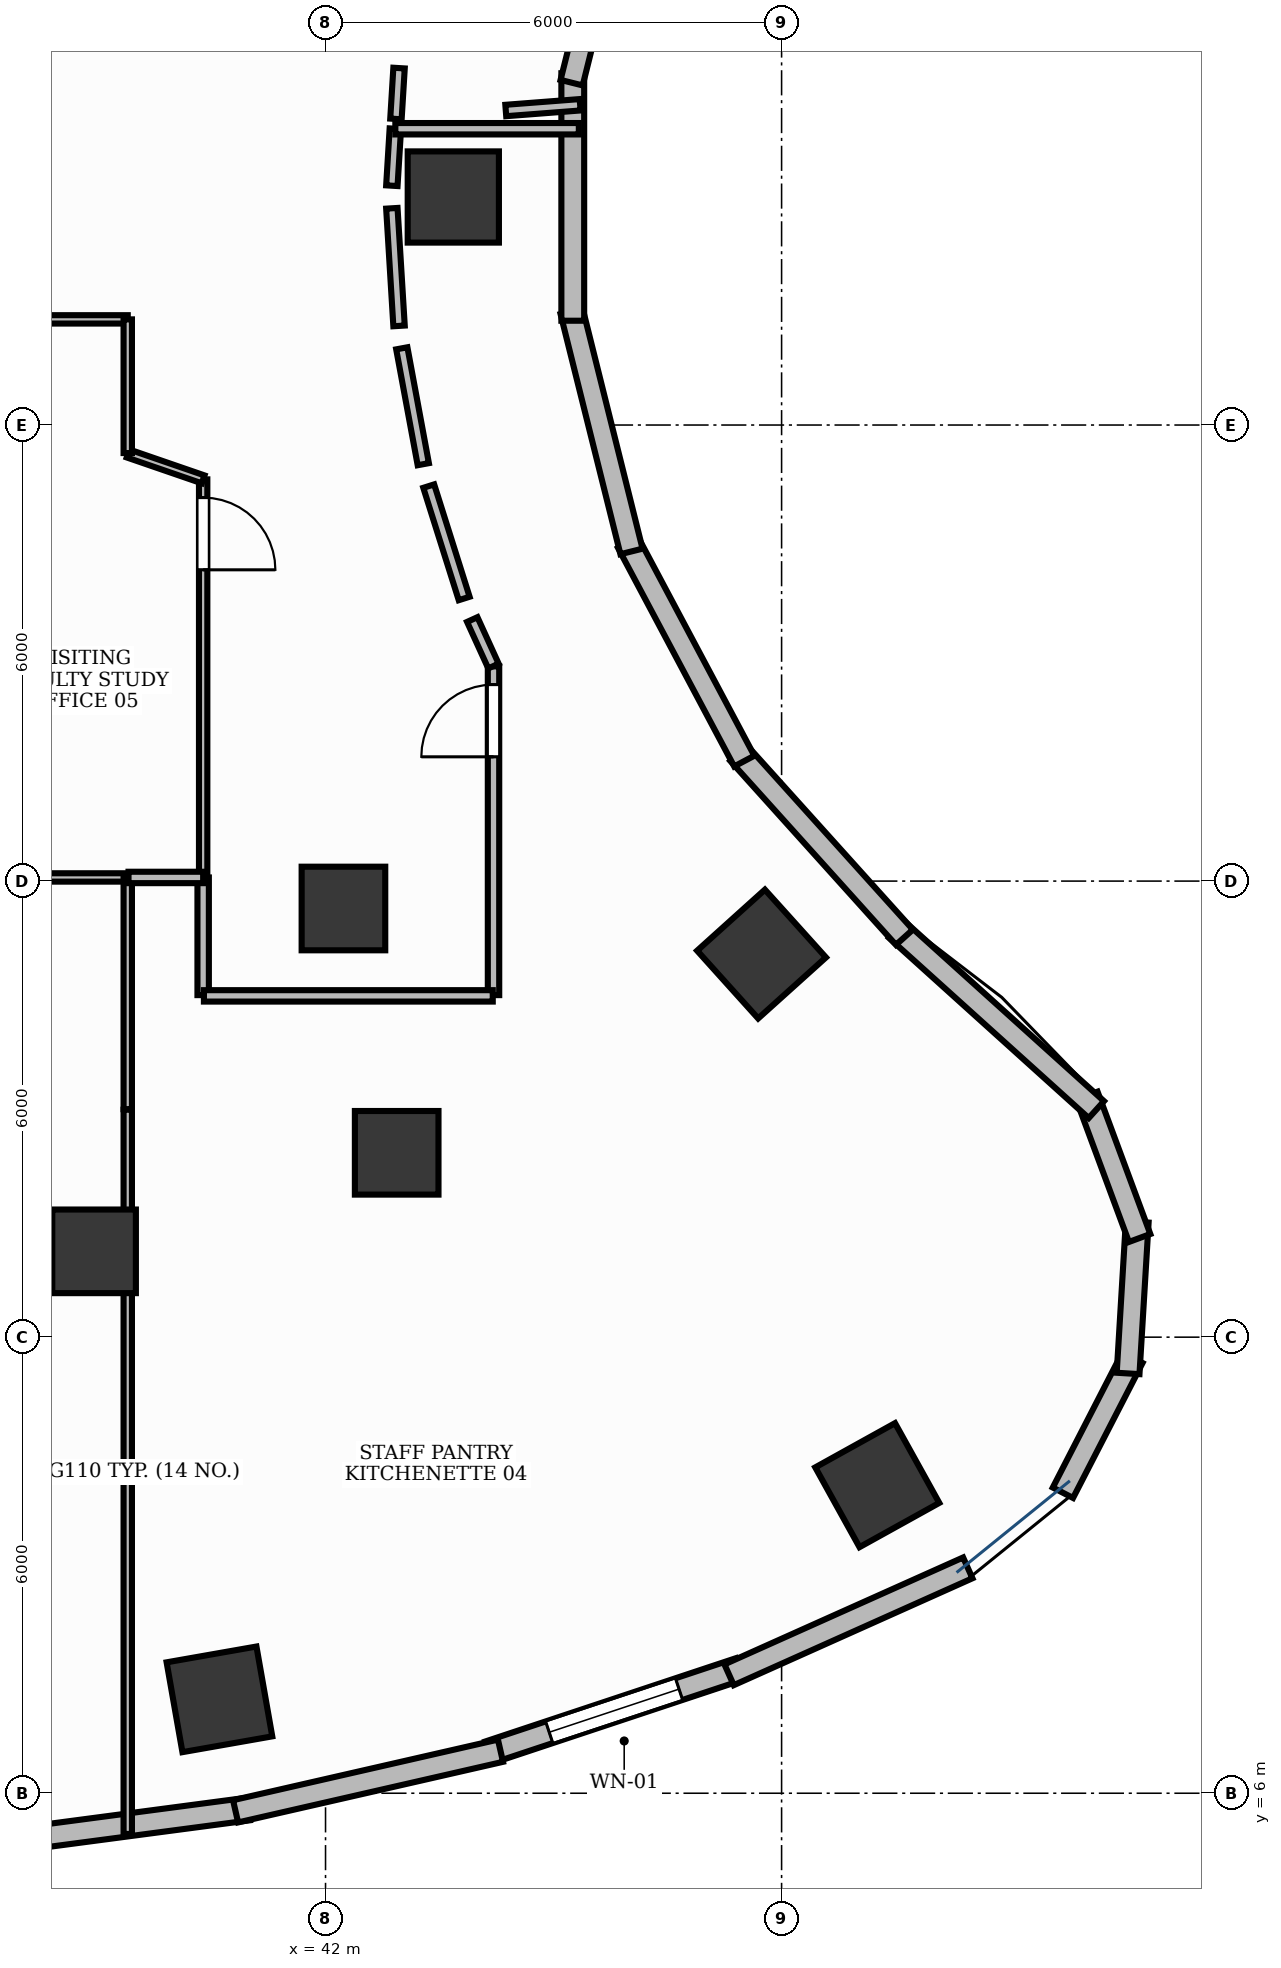
"""IFC4 building model, lengths in metres.
Left out: names, types, materials, properties, quantities, classifications, styles, units other than length and angle.
Written with IfcOpenShell. Run it as: python <this file> out.ifc"""

import sys

from ifc_helpers import new_model, si_unit, direction, frame, frame_2d, origin, origin_2d, place, context, subcontext, project, spatial, rectangle, extrude, element, fill, save


model = new_model("IFC4")
c1 = context("Model", 3, precision=1e-05, world=origin(), true_north=direction((0.0, 1.0)))
c2 = subcontext(c1, "Body", "Model", "MODEL_VIEW")
j1 = project(units=[si_unit("LENGTHUNIT", "METRE"), si_unit("PLANEANGLEUNIT", "RADIAN")], contexts=[c1])
p1 = place(None, origin())
s1 = spatial("IfcSite", under=j1, at=p1, CompositionType="ELEMENT")
p2 = place(p1, origin())
s2 = spatial("IfcBuilding", under=s1, at=p2, CompositionType="ELEMENT")
p3 = place(p2, frame((0.0, 0.0, 127.8)))
s3 = spatial("IfcBuildingStorey", under=s2, at=p3, CompositionType="ELEMENT", Elevation=127.8)
p4 = place(p3, frame((40.604, 7.235, -0.0), z_axis=(0.0, 0.0, 1.0), x_axis=(0.984868307662, 0.173304404339, 0.0)))
e1 = element("IfcColumn", 1, at=p4, inside=s3, PredefinedType="COLUMN", context=c2, shape_type="SweptSolid", body=[
    extrude(rectangle(XDim=1.2, YDim=1.2, at=origin_2d()), origin(), (0.0, 0.0, 1.0), 3.901),
])
p5 = place(p3, frame((38.955, 13.129, -0.0), z_axis=(0.0, 0.0, 1.0), x_axis=(1.0, 0.0, 0.0)))
e2 = element("IfcColumn", 2, at=p5, inside=s3, PredefinedType="COLUMN", context=c2, shape_type="SweptSolid", body=[
    extrude(rectangle(XDim=1.1, YDim=1.1, at=origin_2d()), origin(), (0.0, 0.0, 1.0), 3.901),
])
p6 = place(p3, frame((49.259, 10.053, -0.0), z_axis=(0.0, 0.0, 1.0), x_axis=(0.874535078577, 0.484962262797, 0.0)))
e3 = element("IfcColumn", 3, at=p6, inside=s3, PredefinedType="COLUMN", context=c2, shape_type="SweptSolid", body=[
    extrude(rectangle(XDim=1.2, YDim=1.2, at=origin_2d()), origin(), (0.0, 0.0, 1.0), 3.901),
])
p7 = place(p3, frame((42.936, 14.425, -0.0), z_axis=(0.0, 0.0, 1.0), x_axis=(1.0, 0.0, 0.0)))
e4 = element("IfcColumn", 4, at=p7, inside=s3, PredefinedType="COLUMN", context=c2, shape_type="SweptSolid", body=[
    extrude(rectangle(XDim=1.1, YDim=1.1, at=origin_2d()), origin(), (0.0, 0.0, 1.0), 3.901),
])
p8 = place(p3, frame((47.736, 17.04, -0.0), z_axis=(0.0, 0.0, 1.0), x_axis=(-0.669130606359, 0.743144825477, 0.0)))
e5 = element("IfcColumn", 5, at=p8, inside=s3, PredefinedType="COLUMN", context=c2, shape_type="SweptSolid", body=[
    extrude(rectangle(XDim=1.2, YDim=1.2, at=origin_2d()), origin(), (0.0, 0.0, 1.0), 3.901),
])
p9 = place(p3, frame((42.236, 17.639, -0.0), z_axis=(0.0, 0.0, 1.0), x_axis=(1.0, 0.0, 0.0)))
e6 = element("IfcColumn", 6, at=p9, inside=s3, PredefinedType="COLUMN", context=c2, shape_type="SweptSolid", body=[
    extrude(rectangle(XDim=1.1, YDim=1.1, at=origin_2d()), origin(), (0.0, 0.0, 1.0), 3.901),
])
p10 = place(p3, frame((43.681, 27.0, -0.0), z_axis=(0.0, 0.0, 1.0), x_axis=(0.0, 1.0, 0.0)))
e7 = element("IfcColumn", 7, at=p10, inside=s3, PredefinedType="COLUMN", context=c2, shape_type="SweptSolid", body=[
    extrude(rectangle(XDim=1.2, YDim=1.2, at=origin_2d()), origin(), (0.0, 0.0, 1.0), 3.901),
])
p11 = place(p3, frame((44.147, 6.538, 0.0), z_axis=(0.0, 0.0, 1.0), x_axis=(0.948949854506, 0.315426970364, 0.0)))
e8 = element("IfcWall", 8, at=p11, inside=s3, PredefinedType="STANDARD", context=c2, shape_type="SweptSolid", body=[
    extrude(rectangle(XDim=3.476, YDim=0.3, at=frame_2d((1.738, 0.0))), origin(), (0.0, 0.0, 1.0), 3.9),
])
p12 = place(p11, frame((0.838, 0.0, 0.9)))
e9 = element("IfcOpeningElement", 9, at=p12, cuts=e8, PredefinedType="OPENING", context=c2, shape_type="SweptSolid", body=[
    extrude(rectangle(XDim=1.8, YDim=2.1, at=frame_2d((0.9, 1.05))), frame((0.0, 0.165, 0.0), z_axis=(0.0, -1.0, 0.0), x_axis=(1.0, 0.0, 0.0)), (0.0, 0.0, 1.0), 0.33),
])
p13 = place(p3, frame((37.402, 5.319, 0.0), z_axis=(0.0, 0.0, 1.0), x_axis=(0.991372969521, 0.131071107816, 0.0)))
e10 = element("IfcWall", 10, at=p13, inside=s3, PredefinedType="STANDARD", context=c2, shape_type="SweptSolid", body=[
    extrude(rectangle(XDim=3.615, YDim=0.3, at=frame_2d((1.808, 0.0))), origin(), (0.0, 0.0, 1.0), 3.9),
])
p14 = place(p3, frame((40.816, 5.762, 0.0), z_axis=(0.0, 0.0, 1.0), x_axis=(0.974841550422, 0.222898971669, 0.0)))
e11 = element("IfcWall", 11, at=p14, inside=s3, PredefinedType="STANDARD", context=c2, shape_type="SweptSolid", body=[
    extrude(rectangle(XDim=3.575, YDim=0.3, at=frame_2d((1.788, 0.0))), origin(), (0.0, 0.0, 1.0), 3.9),
])
p15 = place(p3, frame((47.309, 7.559, 0.0), z_axis=(0.0, 0.0, 1.0), x_axis=(0.912672725317, 0.408691199395, 0.0)))
e12 = element("IfcWall", 12, at=p15, inside=s3, PredefinedType="STANDARD", context=c2, shape_type="SweptSolid", body=[
    extrude(rectangle(XDim=3.441, YDim=0.3, at=frame_2d((1.72, 0.0))), origin(), (0.0, 0.0, 1.0), 3.9),
])
for number, where, z_axis, x_axis in (
    (13, (51.701, 9.953, 0.0), (0.0, 0.0, 1.0), (0.458, 0.889, 0.0)),
    (14, (52.559, 11.523, 0.0), (0.0, 0.0, 1.0), (0.06, 0.998, 0.0)),
):
    element("IfcWall", number, at=place(p3, frame(where, z_axis=z_axis, x_axis=x_axis)), inside=s3, PredefinedType="STANDARD", context=c2, shape_type="SweptSolid", body=[
        extrude(rectangle(XDim=1.998, YDim=0.3, at=frame_2d((0.999, 0.0))), origin(), (0.0, 0.0, 1.0), 3.9),
    ])
p16 = place(p3, frame((52.71, 13.305, 0.0), z_axis=(0.0, 0.0, 1.0), x_axis=(-0.347370087337, 0.937728117539, 0.0)))
e15 = element("IfcWall", 15, at=p16, inside=s3, PredefinedType="STANDARD", context=c2, shape_type="SweptSolid", body=[
    extrude(rectangle(XDim=1.997, YDim=0.3, at=frame_2d((0.999, 0.0))), origin(), (0.0, 0.0, 1.0), 3.9),
])
p17 = place(p3, frame((52.141, 14.994, 0.0), z_axis=(0.0, 0.0, 1.0), x_axis=(-0.74255963233, 0.669779958221, 0.0)))
e16 = element("IfcWall", 16, at=p17, inside=s3, PredefinedType="STANDARD", context=c2, shape_type="SweptSolid", body=[
    extrude(rectangle(XDim=3.539, YDim=0.3, at=frame_2d((1.77, 0.0))), origin(), (0.0, 0.0, 1.0), 3.9),
])
p18 = place(p3, frame((49.616, 17.262, 0.0), z_axis=(0.0, 0.0, 1.0), x_axis=(-0.669167727967, 0.743111399353, 0.0)))
e17 = element("IfcWall", 17, at=p18, inside=s3, PredefinedType="STANDARD", context=c2, shape_type="SweptSolid", body=[
    extrude(rectangle(XDim=3.255, YDim=0.3, at=frame_2d((1.628, 0.0))), origin(), (0.0, 0.0, 1.0), 3.9),
])
p19 = place(p3, frame((47.509, 19.579, 0.0), z_axis=(0.0, 0.0, 1.0), x_axis=(-0.469451284634, 0.882958374645, 0.0)))
e18 = element("IfcWall", 18, at=p19, inside=s3, PredefinedType="STANDARD", context=c2, shape_type="SweptSolid", body=[
    extrude(rectangle(XDim=3.256, YDim=0.3, at=frame_2d((1.628, 0.0))), origin(), (0.0, 0.0, 1.0), 3.9),
])
p20 = place(p3, frame((46.025, 22.337, 0.0), z_axis=(0.0, 0.0, 1.0), x_axis=(-0.241900409149, 0.970301083197, 0.0)))
e19 = element("IfcWall", 19, at=p20, inside=s3, PredefinedType="STANDARD", context=c2, shape_type="SweptSolid", body=[
    extrude(rectangle(XDim=3.256, YDim=0.3, at=frame_2d((1.628, 0.0))), origin(), (0.0, 0.0, 1.0), 3.9),
])
p21 = place(p3, frame((45.253, 25.372, 0.0), z_axis=(0.0, 0.0, 1.0), x_axis=(0.0, 1.0, 0.0)))
e20 = element("IfcWall", 20, at=p21, inside=s3, PredefinedType="STANDARD", context=c2, shape_type="SweptSolid", body=[
    extrude(rectangle(XDim=3.255, YDim=0.3, at=frame_2d((1.628, 0.0))), origin(), (0.0, 0.0, 1.0), 3.9),
])
p22 = place(p3, frame((45.238, 28.504, 0.0), z_axis=(0.0, 0.0, 1.0), x_axis=(0.241900409149, 0.970301083197, 0.0)))
e21 = element("IfcWall", 21, at=p22, inside=s3, PredefinedType="STANDARD", context=c2, shape_type="SweptSolid", body=[
    extrude(rectangle(XDim=3.256, YDim=0.3, at=frame_2d((1.628, 0.0))), origin(), (0.0, 0.0, 1.0), 3.9),
])
p23 = place(p3, frame((44.21, 16.5, 0.0), z_axis=(0.0, 0.0, 1.0), x_axis=(0.0, 1.0, 0.0)))
e22 = element("IfcWall", 22, at=p23, inside=s3, PredefinedType="PARTITIONING", context=c2, shape_type="SweptSolid", body=[
    extrude(rectangle(XDim=4.325, YDim=0.15, at=frame_2d((2.163, 0.0))), origin(), (0.0, 0.0, 1.0), 2.91),
])
p24 = place(p23, frame((3.135, 0.0, 0.0)))
e23 = element("IfcOpeningElement", 23, at=p24, cuts=e22, PredefinedType="OPENING", context=c2, shape_type="SweptSolid", body=[
    extrude(rectangle(XDim=0.95, YDim=2.15, at=frame_2d((0.475, 1.075))), frame((0.0, 0.09, 0.0), z_axis=(0.0, -1.0, 0.0), x_axis=(1.0, 0.0, 0.0)), (0.0, 0.0, 1.0), 0.18),
])
p25 = place(p3, frame((40.39, 23.285, 0.0), z_axis=(0.0, 0.0, 1.0), x_axis=(0.0, -1.0, 0.0)))
e24 = element("IfcWall", 24, at=p25, inside=s3, PredefinedType="MOVABLE", context=c2, shape_type="SweptSolid", body=[
    extrude(rectangle(XDim=5.227, YDim=0.11, at=frame_2d((2.614, 0.0))), origin(), (0.0, 0.0, 1.0), 2.91),
])
p26 = place(p25, frame((0.24, 0.0, 0.0)))
e25 = element("IfcOpeningElement", 25, at=p26, cuts=e24, PredefinedType="OPENING", context=c2, shape_type="SweptSolid", body=[
    extrude(rectangle(XDim=0.95, YDim=2.15, at=frame_2d((0.475, 1.075))), frame((0.0, 0.07, 0.0), z_axis=(0.0, -1.0, 0.0), x_axis=(1.0, 0.0, 0.0)), (0.0, 0.0, 1.0), 0.14),
])
p27 = place(p3, frame((36.912, 18.048, 0.0), z_axis=(0.0, 0.0, 1.0), x_axis=(1.0, 0.0, 0.0)))
e26 = element("IfcWall", 26, at=p27, inside=s3, PredefinedType="MOVABLE", context=c2, shape_type="SweptSolid", body=[
    extrude(rectangle(XDim=2.486, YDim=0.11, at=frame_2d((1.243, 0.0))), origin(), (0.0, 0.0, 1.0), 2.91),
])
p28 = place(p3, frame((39.398, 18.048, 0.0), z_axis=(0.0, 0.0, 1.0), x_axis=(0.0, -1.0, 0.0)))
e27 = element("IfcWall", 27, at=p28, inside=s3, PredefinedType="MOVABLE", context=c2, shape_type="SweptSolid", body=[
    extrude(rectangle(XDim=3.049, YDim=0.11, at=frame_2d((1.524, 0.0))), origin(), (0.0, 0.0, 1.0), 2.91),
])
p29 = place(p3, frame((39.398, 14.993, 0.0), z_axis=(0.0, 0.0, 1.0), x_axis=(0.0, -1.0, 0.0)))
e28 = element("IfcWall", 28, at=p29, inside=s3, PredefinedType="MOVABLE", context=c2, shape_type="SweptSolid", body=[
    extrude(rectangle(XDim=9.529, YDim=0.11, at=frame_2d((4.764, 0.0))), origin(), (0.0, 0.0, 1.0), 2.91),
])
p30 = place(p3, frame((40.39, 18.048, 0.0), z_axis=(0.0, 0.0, 1.0), x_axis=(0.0, -1.0, 0.0)))
e29 = element("IfcWall", 29, at=p30, inside=s3, PredefinedType="PARTITIONING", context=c2, shape_type="SweptSolid", body=[
    extrude(rectangle(XDim=1.548, YDim=0.15, at=frame_2d((0.774, 0.0))), origin(), (0.0, 0.0, 1.0), 2.91),
])
p31 = place(p3, frame((40.4, 16.49, 0.0), z_axis=(0.0, 0.0, 1.0), x_axis=(1.0, 0.0, 0.0)))
e30 = element("IfcWall", 30, at=p31, inside=s3, PredefinedType="PARTITIONING", context=c2, shape_type="SweptSolid", body=[
    extrude(rectangle(XDim=3.8, YDim=0.15, at=frame_2d((1.9, 0.0))), origin(), (0.0, 0.0, 1.0), 2.91),
])
p32 = place(p3, frame((44.209, 20.829, 0.0), z_axis=(0.0, 0.0, 1.0), x_axis=(-0.414377467152, 0.910105111905, 0.0)))
e31 = element("IfcWall", 31, at=p32, inside=s3, PredefinedType="PARTITIONING", context=c2, shape_type="SweptSolid", body=[
    extrude(rectangle(XDim=0.672, YDim=0.15, at=frame_2d((0.336, 0.0))), origin(), (0.0, 0.0, 1.0), 2.91),
])
p33 = place(p3, frame((43.824, 21.718, 0.0), z_axis=(0.0, 0.0, 1.0), x_axis=(-0.300641414783, 0.953737248783, 0.0)))
e32 = element("IfcWall", 32, at=p33, inside=s3, PredefinedType="PARTITIONING", context=c2, shape_type="SweptSolid", body=[
    extrude(rectangle(XDim=1.55, YDim=0.15, at=frame_2d((0.775, 0.0))), origin(), (0.0, 0.0, 1.0), 2.91),
])
p34 = place(p3, frame((43.286, 23.485, 0.0), z_axis=(0.0, 0.0, 1.0), x_axis=(-0.182168192784, 0.983267384559, 0.0)))
e33 = element("IfcWall", 33, at=p34, inside=s3, PredefinedType="PARTITIONING", context=c2, shape_type="SweptSolid", body=[
    extrude(rectangle(XDim=1.551, YDim=0.15, at=frame_2d((0.775, 0.0))), origin(), (0.0, 0.0, 1.0), 2.91),
])
p35 = place(p3, frame((42.967, 25.304, 0.0), z_axis=(0.0, 0.0, 1.0), x_axis=(-0.061103659378, 0.99813142562, 0.0)))
e34 = element("IfcWall", 34, at=p35, inside=s3, PredefinedType="PARTITIONING", context=c2, shape_type="SweptSolid", body=[
    extrude(rectangle(XDim=1.55, YDim=0.15, at=frame_2d((0.775, 0.0))), origin(), (0.0, 0.0, 1.0), 2.91),
])
p36 = place(p3, frame((42.873, 27.149, 0.0), z_axis=(0.0, 0.0, 1.0), x_axis=(0.061143125985, 0.998129008768, 0.0)))
e35 = element("IfcWall", 35, at=p36, inside=s3, PredefinedType="PARTITIONING", context=c2, shape_type="SweptSolid", body=[
    extrude(rectangle(XDim=0.751, YDim=0.15, at=frame_2d((0.375, 0.0))), origin(), (0.0, 0.0, 1.0), 2.91),
])
p37 = place(p3, frame((42.918, 27.898, 0.0), z_axis=(0.0, 0.0, 1.0), x_axis=(1.0, 0.0, 0.0)))
e36 = element("IfcWall", 36, at=p37, inside=s3, PredefinedType="PARTITIONING", context=c2, shape_type="SweptSolid", body=[
    extrude(rectangle(XDim=2.414, YDim=0.15, at=frame_2d((1.207, 0.0))), origin(), (0.0, 0.0, 1.0), 2.91),
])
p38 = place(p3, frame((39.408, 18.048, 0.0), z_axis=(0.0, 0.0, 1.0), x_axis=(1.0, 0.0, 0.0)))
e37 = element("IfcWall", 37, at=p38, inside=s3, PredefinedType="PARTITIONING", context=c2, shape_type="SweptSolid", body=[
    extrude(rectangle(XDim=0.982, YDim=0.15, at=frame_2d((0.491, 0.0))), origin(), (0.0, 0.0, 1.0), 2.91),
])
p39 = place(p3, frame((39.402, 23.625, 0.0), z_axis=(0.0, 0.0, 1.0), x_axis=(0.945457381587, -0.325745820547, 0.0)))
e38 = element("IfcWall", 38, at=p39, inside=s3, PredefinedType="MOVABLE", context=c2, shape_type="SweptSolid", body=[
    extrude(rectangle(XDim=1.045, YDim=0.11, at=frame_2d((0.522, 0.0))), origin(), (0.0, 0.0, 1.0), 2.91),
])
p40 = place(p3, frame((37.36, 25.39, 0.0), z_axis=(0.0, 0.0, 1.0), x_axis=(1.0, 0.0, 0.0)))
e39 = element("IfcWall", 39, at=p40, inside=s3, PredefinedType="MOVABLE", context=c2, shape_type="SweptSolid", body=[
    extrude(rectangle(XDim=2.038, YDim=0.11, at=frame_2d((1.019, 0.0))), origin(), (0.0, 0.0, 1.0), 2.91),
])
p41 = place(p3, frame((39.398, 25.39, 0.0), z_axis=(0.0, 0.0, 1.0), x_axis=(0.0, -1.0, 0.0)))
e40 = element("IfcWall", 40, at=p41, inside=s3, PredefinedType="MOVABLE", context=c2, shape_type="SweptSolid", body=[
    extrude(rectangle(XDim=1.759, YDim=0.11, at=frame_2d((0.879, 0.0))), origin(), (0.0, 0.0, 1.0), 2.91),
])
p42 = place(p3, frame((45.35, 28.213, 0.0), z_axis=(0.0, 0.0, 1.0), x_axis=(-0.997039830609, -0.076886775058, 0.0)))
e41 = element("IfcWall", 41, at=p42, inside=s3, PredefinedType="PARTITIONING", context=c2, shape_type="SweptSolid", body=[
    extrude(rectangle(XDim=0.981, YDim=0.15, at=frame_2d((0.491, 0.0))), origin(), (0.0, 0.0, 1.0), 2.91),
])
p43 = place(p3, frame((42.926, 28.027, 0.0), z_axis=(0.0, 0.0, 1.0), x_axis=(0.061176697513, 0.998126951686, 0.0)))
e42 = element("IfcWall", 42, at=p43, inside=s3, PredefinedType="PARTITIONING", context=c2, shape_type="SweptSolid", body=[
    extrude(rectangle(XDim=0.67, YDim=0.15, at=frame_2d((0.335, 0.0))), origin(), (0.0, 0.0, 1.0), 2.91),
])
p44 = place(p12, origin())
e43 = element("IfcWindow", 43, at=p44, inside=s3, PartitioningType="SINGLE_PANEL", PredefinedType="WINDOW", context=c2, shape_type="SweptSolid", body=[
    extrude(rectangle(XDim=1.8, YDim=2.1, at=frame_2d((0.9, 1.05))), frame((0.0, 0.03, 0.0), z_axis=(0.0, -1.0, 0.0), x_axis=(1.0, 0.0, 0.0)), (0.0, 0.0, 1.0), 0.06),
])
fill(e9, e43)
p45 = place(p24, origin())
e44 = element("IfcDoor", 44, at=p45, inside=s3, OperationType="SINGLE_SWING_LEFT", PredefinedType="DOOR", context=c2, shape_type="SweptSolid", body=[
    extrude(rectangle(XDim=0.95, YDim=2.15, at=frame_2d((0.475, 1.075))), frame((0.0, 0.025, 0.0), z_axis=(0.0, -1.0, 0.0), x_axis=(1.0, 0.0, 0.0)), (0.0, 0.0, 1.0), 0.05),
])
fill(e23, e44)
p46 = place(p26, origin())
e45 = element("IfcDoor", 45, at=p46, inside=s3, OperationType="SINGLE_SWING_RIGHT", PredefinedType="DOOR", context=c2, shape_type="SweptSolid", body=[
    extrude(rectangle(XDim=0.95, YDim=2.15, at=frame_2d((0.475, 1.075))), frame((0.0, 0.025, 0.0), z_axis=(0.0, -1.0, 0.0), x_axis=(1.0, 0.0, 0.0)), (0.0, 0.0, 1.0), 0.05),
])
fill(e25, e45)
save(model, sys.argv[1])
